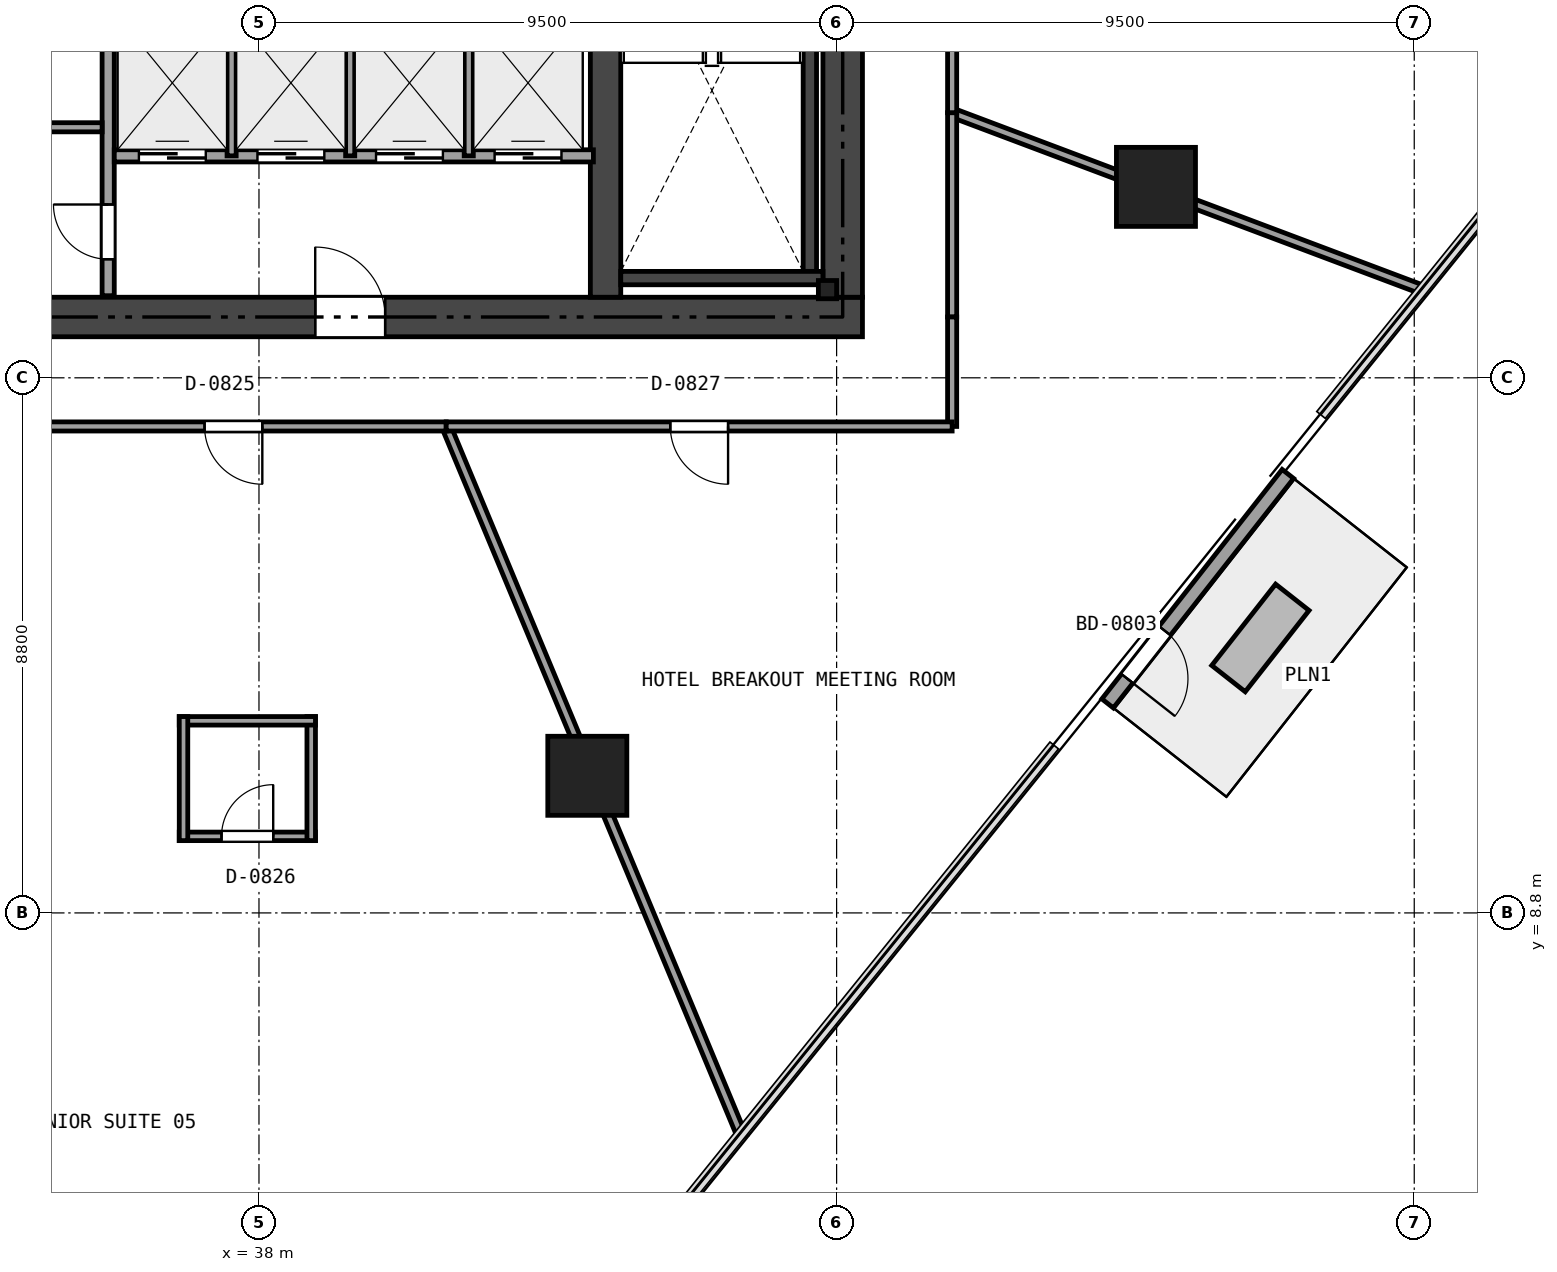
"""IFC4 building model, lengths in metres.
Left out: names, types, materials, properties, quantities, classifications, styles, units other than length and angle.
Written with IfcOpenShell. Run it as: python <this file> out.ifc"""

import sys

from ifc_helpers import new_model, si_unit, direction, frame, frame_2d, origin, origin_2d, place, context, subcontext, project, spatial, rectangle, i_section, extrude, element, fill, save


model = new_model("IFC4")
c1 = context("Model", 3, precision=1e-05, world=origin(), true_north=direction((0.0, 1.0)))
c2 = subcontext(c1, "Body", "Model", "MODEL_VIEW")
j1 = project(units=[si_unit("LENGTHUNIT", "METRE"), si_unit("PLANEANGLEUNIT", "RADIAN")], contexts=[c1])
p1 = place(None, origin())
s1 = spatial("IfcSite", under=j1, at=p1, CompositionType="ELEMENT")
p2 = place(p1, origin())
s2 = spatial("IfcBuilding", under=s1, at=p2, CompositionType="ELEMENT")
p3 = place(p2, frame((0.0, 0.0, 37.35)))
s3 = spatial("IfcBuildingStorey", under=s2, at=p3, CompositionType="ELEMENT", Elevation=37.35)
p4 = place(p3, frame((26.475, 18.6, 0.0), z_axis=(0.0, 0.0, 1.0), x_axis=(1.0, 0.0, 0.0)))
e1 = element("IfcWall", 1, at=p4, inside=s3, PredefinedType="SHEAR", context=c2, shape_type="SweptSolid", body=[
    extrude(rectangle(XDim=21.45, YDim=0.65, at=frame_2d((10.725, 0.0))), origin(), (0.0, 0.0, 1.0), 3.17),
])
p5 = place(p4, frame((12.45, 0.0, 0.0)))
e2 = element("IfcOpeningElement", 2, at=p5, cuts=e1, PredefinedType="OPENING", context=c2, shape_type="SweptSolid", body=[
    extrude(rectangle(XDim=1.15, YDim=2.15, at=frame_2d((0.575, 1.075))), frame((0.0, 0.335, 0.0), z_axis=(0.0, -1.0, 0.0), x_axis=(1.0, 0.0, 0.0)), (0.0, 0.0, 1.0), 0.67),
])
p6 = place(p4, frame((5.275, 0.0, 0.0)))
e3 = element("IfcOpeningElement", 3, at=p6, cuts=e1, PredefinedType="OPENING", context=c2, shape_type="SweptSolid", body=[
    extrude(rectangle(XDim=0.9, YDim=2.1, at=frame_2d((0.45, 1.05))), frame((0.0, 0.335, 0.0), z_axis=(0.0, -1.0, 0.0), x_axis=(1.0, 0.0, 0.0)), (0.0, 0.0, 1.0), 0.67),
])
p7 = place(p3, frame((47.6, 18.925, 0.0), z_axis=(0.0, 0.0, 1.0), x_axis=(0.0, 1.0, 0.0)))
e4 = element("IfcWall", 4, at=p7, inside=s3, PredefinedType="SHEAR", context=c2, shape_type="SweptSolid", body=[
    extrude(rectangle(XDim=14.95, YDim=0.65, at=frame_2d((7.475, 0.0))), origin(), (0.0, 0.0, 1.0), 3.17),
])
p8 = place(p7, frame((6.575, 0.0, 0.0)))
e5 = element("IfcOpeningElement", 5, at=p8, cuts=e4, PredefinedType="OPENING", context=c2, shape_type="SweptSolid", body=[
    extrude(rectangle(XDim=1.1, YDim=2.15, at=frame_2d((0.55, 1.075))), frame((0.0, 0.335, 0.0), z_axis=(0.0, -1.0, 0.0), x_axis=(1.0, 0.0, 0.0)), (0.0, 0.0, 1.0), 0.67),
])
p9 = place(p7, frame((8.475, 0.0, 0.0)))
e6 = element("IfcOpeningElement", 6, at=p9, cuts=e4, PredefinedType="OPENING", context=c2, shape_type="SweptSolid", body=[
    extrude(rectangle(XDim=0.9, YDim=2.1, at=frame_2d((0.45, 1.05))), frame((0.0, 0.335, 0.0), z_axis=(0.0, -1.0, 0.0), x_axis=(1.0, 0.0, 0.0)), (0.0, 0.0, 1.0), 0.67),
])
p10 = place(p7, frame((13.125, 0.0, 0.0)))
e7 = element("IfcOpeningElement", 7, at=p10, cuts=e4, PredefinedType="OPENING", context=c2, shape_type="SweptSolid", body=[
    extrude(rectangle(XDim=0.9, YDim=2.1, at=frame_2d((0.45, 1.05))), frame((0.0, 0.335, 0.0), z_axis=(0.0, -1.0, 0.0), x_axis=(1.0, 0.0, 0.0)), (0.0, 0.0, 1.0), 0.67),
])
p11 = place(p3, frame((43.7, 18.925, 0.0), z_axis=(0.0, 0.0, 1.0), x_axis=(0.0, 1.0, 0.0)))
e8 = element("IfcWall", 8, at=p11, inside=s3, PredefinedType="SHEAR", context=c2, shape_type="SweptSolid", body=[
    extrude(rectangle(XDim=14.95, YDim=0.5, at=frame_2d((7.475, 0.0))), origin(), (0.0, 0.0, 1.0), 3.17),
])
p12 = place(p11, frame((8.075, 0.0, 0.0)))
e9 = element("IfcOpeningElement", 9, at=p12, cuts=e8, PredefinedType="OPENING", context=c2, shape_type="SweptSolid", body=[
    extrude(rectangle(XDim=0.9, YDim=2.1, at=frame_2d((0.45, 1.05))), frame((0.0, 0.26, 0.0), z_axis=(0.0, -1.0, 0.0), x_axis=(1.0, 0.0, 0.0)), (0.0, 0.0, 1.0), 0.52),
])
p13 = place(p3, frame((47.06, 19.35, 0.0), z_axis=(0.0, 0.0, 1.0), x_axis=(0.0, 1.0, 0.0)))
e10 = element("IfcWall", 10, at=p13, inside=s3, PredefinedType="SHEAR", context=c2, shape_type="SweptSolid", body=[
    extrude(rectangle(XDim=5.9, YDim=0.22, at=frame_2d((2.95, 0.0))), origin(), (0.0, 0.0, 1.0), 3.17),
])
p14 = place(p3, frame((43.95, 19.24, 0.0), z_axis=(0.0, 0.0, 1.0), x_axis=(1.0, 0.0, 0.0)))
e11 = element("IfcWall", 11, at=p14, inside=s3, PredefinedType="SHEAR", context=c2, shape_type="SweptSolid", body=[
    extrude(rectangle(XDim=3.325, YDim=0.22, at=frame_2d((1.663, 0.0))), origin(), (0.0, 0.0, 1.0), 3.17),
])
for number, where, z_axis, x_axis in (
    (12, (43.4, 11.055, 0.0), (0.0, 0.0, 1.0), (1.0, 0.0, 0.0)),
    (13, (52.752, 20.74, 0.0), (0.0, 0.0, 1.0), (1.0, 0.0, 0.0)),
):
    element("IfcColumn", number, at=place(p3, frame(where, z_axis=z_axis, x_axis=x_axis)), inside=s3, PredefinedType="COLUMN", context=c2, shape_type="SweptSolid", body=[
        extrude(rectangle(XDim=1.3, YDim=1.3, at=origin_2d()), origin(), (0.0, 0.0, 1.0), 3.17),
    ])
p15 = place(p3, frame((47.35, 19.05, 0.0), z_axis=(0.0, 0.0, 1.0), x_axis=(1.0, 0.0, 0.0)))
e14 = element("IfcColumn", 14, at=p15, inside=s3, PredefinedType="PILASTER", context=c2, shape_type="SweptSolid", body=[
    extrude(i_section(OverallWidth=0.3, OverallDepth=0.3, WebThickness=0.011, FlangeThickness=0.019, at=origin_2d()), origin(), (0.0, 0.0, 1.0), 3.17),
])
p16 = place(p3, frame((54.922, 16.019, 0.0), z_axis=(0.0, 0.0, 1.0), x_axis=(-0.617803579139, -0.78633245997, 0.0)))
e15 = element("IfcWall", 15, at=p16, inside=s3, PredefinedType="SOLIDWALL", context=c2, shape_type="SweptSolid", body=[
    extrude(rectangle(XDim=4.799, YDim=0.24, at=frame_2d((2.4, 0.0))), origin(), (0.0, 0.0, 1.0), 3.17),
])
p17 = place(p16, frame((3.279, 0.0, 0.0)))
e16 = element("IfcOpeningElement", 16, at=p17, cuts=e15, PredefinedType="OPENING", context=c2, shape_type="SweptSolid", body=[
    extrude(rectangle(XDim=1.0, YDim=2.15, at=frame_2d((0.5, 1.075))), frame((0.0, 0.13, 0.0), z_axis=(0.0, -1.0, 0.0), x_axis=(1.0, 0.0, 0.0)), (0.0, 0.0, 1.0), 0.26),
])
p18 = place(p3, frame((35.52, 18.95, 0.0), z_axis=(0.0, 0.0, 1.0), x_axis=(0.0, 1.0, 0.0)))
e17 = element("IfcWall", 17, at=p18, inside=s3, PredefinedType="SOLIDWALL", context=c2, shape_type="SweptSolid", body=[
    extrude(rectangle(XDim=14.9, YDim=0.2, at=frame_2d((7.45, 0.0))), origin(), (0.0, 0.0, 1.0), 2.691),
])
p19 = place(p18, frame((7.755, 0.0, 0.0)))
e18 = element("IfcOpeningElement", 18, at=p19, cuts=e17, PredefinedType="OPENING", context=c2, shape_type="SweptSolid", body=[
    extrude(rectangle(XDim=0.95, YDim=2.15, at=frame_2d((0.475, 1.075))), frame((0.0, 0.11, 0.0), z_axis=(0.0, -1.0, 0.0), x_axis=(1.0, 0.0, 0.0)), (0.0, 0.0, 1.0), 0.22),
])
p20 = place(p18, frame((0.6, 0.0, 0.0)))
e19 = element("IfcOpeningElement", 19, at=p20, cuts=e17, PredefinedType="OPENING", context=c2, shape_type="SweptSolid", body=[
    extrude(rectangle(XDim=0.9, YDim=2.1, at=frame_2d((0.45, 1.05))), frame((0.0, 0.11, 0.0), z_axis=(0.0, -1.0, 0.0), x_axis=(1.0, 0.0, 0.0)), (0.0, 0.0, 1.0), 0.22),
])
p21 = place(p3, frame((33.42, 21.72, 0.0), z_axis=(0.0, 0.0, 1.0), x_axis=(1.0, 0.0, 0.0)))
e20 = element("IfcWall", 20, at=p21, inside=s3, PredefinedType="PARTITIONING", context=c2, shape_type="SweptSolid", body=[
    extrude(rectangle(XDim=2.0, YDim=0.15, at=frame_2d((1.0, 0.0))), origin(), (0.0, 0.0, 1.0), 3.17),
])
p22 = place(p3, frame((35.62, 21.25, 0.0), z_axis=(0.0, 0.0, 1.0), x_axis=(1.0, 0.0, 0.0)))
e21 = element("IfcWall", 21, at=p22, inside=s3, PredefinedType="SOLIDWALL", context=c2, shape_type="SweptSolid", body=[
    extrude(rectangle(XDim=7.88, YDim=0.2, at=frame_2d((3.94, 0.0))), origin(), (0.0, 0.0, 1.0), 3.17),
])
p23 = place(p22, frame((0.405, 0.0, 0.0)))
e22 = element("IfcOpeningElement", 22, at=p23, cuts=e21, PredefinedType="OPENING", context=c2, shape_type="SweptSolid", body=[
    extrude(rectangle(XDim=1.1, YDim=2.15, at=frame_2d((0.55, 1.075))), frame((0.0, 0.11, 0.0), z_axis=(0.0, -1.0, 0.0), x_axis=(1.0, 0.0, 0.0)), (0.0, 0.0, 1.0), 0.22),
])
p24 = place(p22, frame((2.355, 0.0, 0.0)))
e23 = element("IfcOpeningElement", 23, at=p24, cuts=e21, PredefinedType="OPENING", context=c2, shape_type="SweptSolid", body=[
    extrude(rectangle(XDim=1.1, YDim=2.15, at=frame_2d((0.55, 1.075))), frame((0.0, 0.11, 0.0), z_axis=(0.0, -1.0, 0.0), x_axis=(1.0, 0.0, 0.0)), (0.0, 0.0, 1.0), 0.22),
])
p25 = place(p22, frame((4.305, 0.0, 0.0)))
e24 = element("IfcOpeningElement", 24, at=p25, cuts=e21, PredefinedType="OPENING", context=c2, shape_type="SweptSolid", body=[
    extrude(rectangle(XDim=1.1, YDim=2.15, at=frame_2d((0.55, 1.075))), frame((0.0, 0.11, 0.0), z_axis=(0.0, -1.0, 0.0), x_axis=(1.0, 0.0, 0.0)), (0.0, 0.0, 1.0), 0.22),
])
p26 = place(p22, frame((6.255, 0.0, 0.0)))
e25 = element("IfcOpeningElement", 25, at=p26, cuts=e21, PredefinedType="OPENING", context=c2, shape_type="SweptSolid", body=[
    extrude(rectangle(XDim=1.1, YDim=2.15, at=frame_2d((0.55, 1.075))), frame((0.0, 0.11, 0.0), z_axis=(0.0, -1.0, 0.0), x_axis=(1.0, 0.0, 0.0)), (0.0, 0.0, 1.0), 0.22),
])
for number, where, z_axis, x_axis in (
    (26, (37.55, 21.25, 0.0), (0.0, 0.0, 1.0), (0.0, 1.0, 0.0)),
    (27, (39.5, 21.25, 0.0), (0.0, 0.0, 1.0), (0.0, 1.0, 0.0)),
    (28, (41.45, 21.25, 0.0), (0.0, 0.0, 1.0), (0.0, 1.0, 0.0)),
):
    element("IfcWall", number, at=place(p3, frame(where, z_axis=z_axis, x_axis=x_axis)), inside=s3, PredefinedType="PARTITIONING", context=c2, shape_type="SweptSolid", body=[
        extrude(rectangle(XDim=2.4, YDim=0.15, at=frame_2d((1.2, 0.0))), origin(), (0.0, 0.0, 1.0), 2.691),
    ])
p27 = place(p3, frame((36.689, 10.059, 0.0), z_axis=(0.0, 0.0, 1.0), x_axis=(1.0, 0.0, 0.0)))
e29 = element("IfcWall", 29, at=p27, inside=s3, PredefinedType="PARTITIONING", context=c2, shape_type="SweptSolid", body=[
    extrude(rectangle(XDim=2.24, YDim=0.14, at=frame_2d((1.12, 0.0))), origin(), (0.0, 0.0, 1.0), 3.17),
])
p28 = place(p27, frame((0.695, 0.0, 0.0)))
e30 = element("IfcOpeningElement", 30, at=p28, cuts=e29, PredefinedType="OPENING", context=c2, shape_type="SweptSolid", body=[
    extrude(rectangle(XDim=0.85, YDim=2.1, at=frame_2d((0.425, 1.05))), frame((0.0, 0.08, 0.0), z_axis=(0.0, -1.0, 0.0), x_axis=(1.0, 0.0, 0.0)), (0.0, 0.0, 1.0), 0.16),
])
p29 = place(p3, frame((38.859, 9.989, 0.0), z_axis=(0.0, 0.0, 1.0), x_axis=(0.0, 1.0, 0.0)))
e31 = element("IfcWall", 31, at=p29, inside=s3, PredefinedType="PARTITIONING", context=c2, shape_type="SweptSolid", body=[
    extrude(rectangle(XDim=2.04, YDim=0.14, at=frame_2d((1.02, 0.0))), origin(), (0.0, 0.0, 1.0), 2.355),
])
p30 = place(p3, frame((38.929, 11.959, 0.0), z_axis=(0.0, 0.0, 1.0), x_axis=(-1.0, 0.0, 0.0)))
e32 = element("IfcWall", 32, at=p30, inside=s3, PredefinedType="PARTITIONING", context=c2, shape_type="SweptSolid", body=[
    extrude(rectangle(XDim=2.24, YDim=0.14, at=frame_2d((1.12, 0.0))), origin(), (0.0, 0.0, 1.0), 3.17),
])
p31 = place(p3, frame((36.759, 12.029, 0.0), z_axis=(0.0, 0.0, 1.0), x_axis=(0.0, -1.0, 0.0)))
e33 = element("IfcWall", 33, at=p31, inside=s3, PredefinedType="PARTITIONING", context=c2, shape_type="SweptSolid", body=[
    extrude(rectangle(XDim=2.04, YDim=0.14, at=frame_2d((1.02, 0.0))), origin(), (0.0, 0.0, 1.0), 2.355),
])
p32 = place(p3, frame((45.946, 5.115, 0.0), z_axis=(0.0, 0.0, 1.0), x_axis=(-0.384492125133, 0.923128271537, 0.0)))
e34 = element("IfcWall", 34, at=p32, inside=s3, PredefinedType="PARTITIONING", context=c2, shape_type="SweptSolid", body=[
    extrude(rectangle(XDim=12.658, YDim=0.15, at=frame_2d((6.329, 0.0))), origin(), (0.0, 0.0, 1.0), 2.395),
])
p33 = place(p3, frame((41.079, 16.8, 0.0), z_axis=(0.0, 0.0, 1.0), x_axis=(-1.0, 0.0, 0.0)))
e35 = element("IfcWall", 35, at=p33, inside=s3, PredefinedType="PARTITIONING", context=c2, shape_type="SweptSolid", body=[
    extrude(rectangle(XDim=6.998, YDim=0.15, at=frame_2d((3.499, 0.0))), origin(), (0.0, 0.0, 1.0), 2.395),
])
p34 = place(p33, frame((3.024, 0.0, 0.0)))
e36 = element("IfcOpeningElement", 36, at=p34, cuts=e35, PredefinedType="OPENING", context=c2, shape_type="SweptSolid", body=[
    extrude(rectangle(XDim=0.95, YDim=2.15, at=frame_2d((0.475, 1.075))), frame((0.0, 0.085, 0.0), z_axis=(0.0, -1.0, 0.0), x_axis=(1.0, 0.0, 0.0)), (0.0, 0.0, 1.0), 0.17),
])
p35 = place(p3, frame((57.175, 19.034, 0.0), z_axis=(0.0, 0.0, 1.0), x_axis=(-0.935919122146, 0.352214986621, 0.0)))
e37 = element("IfcWall", 37, at=p35, inside=s3, PredefinedType="PARTITIONING", context=c2, shape_type="SweptSolid", body=[
    extrude(rectangle(XDim=8.308, YDim=0.15, at=frame_2d((4.154, 0.0))), origin(), (0.0, 0.0, 1.0), 2.395),
])
p36 = place(p3, frame((49.4, 21.96, 0.0), z_axis=(0.0, 0.0, 1.0), x_axis=(0.0, -1.0, 0.0)))
e38 = element("IfcWall", 38, at=p36, inside=s3, PredefinedType="PARTITIONING", context=c2, shape_type="SweptSolid", body=[
    extrude(rectangle(XDim=3.36, YDim=0.15, at=frame_2d((1.68, 0.0))), origin(), (0.0, 0.0, 1.0), 2.395),
])
p37 = place(p3, frame((49.4, 18.6, 0.0), z_axis=(0.0, 0.0, 1.0), x_axis=(0.0, -1.0, 0.0)))
e39 = element("IfcWall", 39, at=p37, inside=s3, PredefinedType="PARTITIONING", context=c2, shape_type="SweptSolid", body=[
    extrude(rectangle(XDim=1.8, YDim=0.15, at=frame_2d((0.9, 0.0))), origin(), (0.0, 0.0, 1.0), 2.355),
])
p38 = place(p3, frame((49.4, 16.8, 0.0), z_axis=(0.0, 0.0, 1.0), x_axis=(-1.0, 0.0, 0.0)))
e40 = element("IfcWall", 40, at=p38, inside=s3, PredefinedType="PARTITIONING", context=c2, shape_type="SweptSolid", body=[
    extrude(rectangle(XDim=8.321, YDim=0.15, at=frame_2d((4.16, 0.0))), origin(), (0.0, 0.0, 1.0), 2.355),
])
p39 = place(p38, frame((3.685, 0.0, 0.0)))
e41 = element("IfcOpeningElement", 41, at=p39, cuts=e40, PredefinedType="OPENING", context=c2, shape_type="SweptSolid", body=[
    extrude(rectangle(XDim=0.95, YDim=2.15, at=frame_2d((0.475, 1.075))), frame((0.0, 0.085, 0.0), z_axis=(0.0, -1.0, 0.0), x_axis=(1.0, 0.0, 0.0)), (0.0, 0.0, 1.0), 0.17),
])
p40 = place(p3, frame((49.4, 28.993, 0.0), z_axis=(0.0, 0.0, 1.0), x_axis=(0.0, -1.0, 0.0)))
e42 = element("IfcWall", 42, at=p40, inside=s3, PredefinedType="PARTITIONING", context=c2, shape_type="SweptSolid", body=[
    extrude(rectangle(XDim=7.033, YDim=0.15, at=frame_2d((3.517, 0.0))), origin(), (0.0, 0.0, 1.0), 2.395),
])
p41 = place(p40, frame((3.041, 0.0, 0.0)))
e43 = element("IfcOpeningElement", 43, at=p41, cuts=e42, PredefinedType="OPENING", context=c2, shape_type="SweptSolid", body=[
    extrude(rectangle(XDim=0.95, YDim=2.15, at=frame_2d((0.475, 1.075))), frame((0.0, 0.085, 0.0), z_axis=(0.0, -1.0, 0.0), x_axis=(1.0, 0.0, 0.0)), (0.0, 0.0, 1.0), 0.17),
])
p42 = place(p17, origin())
e44 = element("IfcDoor", 44, at=p42, inside=s3, OperationType="SINGLE_SWING_RIGHT", PredefinedType="DOOR", context=c2, shape_type="SweptSolid", body=[
    extrude(rectangle(XDim=1.0, YDim=2.15, at=frame_2d((0.5, 1.075))), frame((0.0, 0.025, 0.0), z_axis=(0.0, -1.0, 0.0), x_axis=(1.0, 0.0, 0.0)), (0.0, 0.0, 1.0), 0.05),
])
fill(e16, e44)
p43 = place(p5, origin())
e45 = element("IfcDoor", 45, at=p43, inside=s3, OperationType="SINGLE_SWING_LEFT", PredefinedType="DOOR", context=c2, shape_type="SweptSolid", body=[
    extrude(rectangle(XDim=1.15, YDim=2.15, at=frame_2d((0.575, 1.075))), frame((0.0, 0.025, 0.0), z_axis=(0.0, -1.0, 0.0), x_axis=(1.0, 0.0, 0.0)), (0.0, 0.0, 1.0), 0.05),
])
fill(e2, e45)
p44 = place(p20, origin())
e46 = element("IfcDoor", 46, at=p44, inside=s3, OperationType="SINGLE_SWING_RIGHT", PredefinedType="DOOR", context=c2, shape_type="SweptSolid", body=[
    extrude(rectangle(XDim=0.9, YDim=2.1, at=frame_2d((0.45, 1.05))), frame((0.0, 0.025, 0.0), z_axis=(0.0, -1.0, 0.0), x_axis=(1.0, 0.0, 0.0)), (0.0, 0.0, 1.0), 0.05),
])
fill(e19, e46)
p45 = place(p23, origin())
e47 = element("IfcDoor", 47, at=p45, inside=s3, OperationType="SLIDING_TO_LEFT", PredefinedType="DOOR", context=c2, shape_type="SweptSolid", body=[
    extrude(rectangle(XDim=1.1, YDim=2.15, at=frame_2d((0.55, 1.075))), frame((0.0, 0.025, 0.0), z_axis=(0.0, -1.0, 0.0), x_axis=(1.0, 0.0, 0.0)), (0.0, 0.0, 1.0), 0.05),
])
fill(e22, e47)
p46 = place(p24, origin())
e48 = element("IfcDoor", 48, at=p46, inside=s3, OperationType="SLIDING_TO_LEFT", PredefinedType="DOOR", context=c2, shape_type="SweptSolid", body=[
    extrude(rectangle(XDim=1.1, YDim=2.15, at=frame_2d((0.55, 1.075))), frame((0.0, 0.025, 0.0), z_axis=(0.0, -1.0, 0.0), x_axis=(1.0, 0.0, 0.0)), (0.0, 0.0, 1.0), 0.05),
])
fill(e23, e48)
p47 = place(p25, origin())
e49 = element("IfcDoor", 49, at=p47, inside=s3, OperationType="SLIDING_TO_LEFT", PredefinedType="DOOR", context=c2, shape_type="SweptSolid", body=[
    extrude(rectangle(XDim=1.1, YDim=2.15, at=frame_2d((0.55, 1.075))), frame((0.0, 0.025, 0.0), z_axis=(0.0, -1.0, 0.0), x_axis=(1.0, 0.0, 0.0)), (0.0, 0.0, 1.0), 0.05),
])
fill(e24, e49)
p48 = place(p26, origin())
e50 = element("IfcDoor", 50, at=p48, inside=s3, OperationType="SLIDING_TO_LEFT", PredefinedType="DOOR", context=c2, shape_type="SweptSolid", body=[
    extrude(rectangle(XDim=1.1, YDim=2.15, at=frame_2d((0.55, 1.075))), frame((0.0, 0.025, 0.0), z_axis=(0.0, -1.0, 0.0), x_axis=(1.0, 0.0, 0.0)), (0.0, 0.0, 1.0), 0.05),
])
fill(e25, e50)
p49 = place(p34, origin())
e51 = element("IfcDoor", 51, at=p49, inside=s3, OperationType="SINGLE_SWING_LEFT", PredefinedType="DOOR", context=c2, shape_type="SweptSolid", body=[
    extrude(rectangle(XDim=0.95, YDim=2.15, at=frame_2d((0.475, 1.075))), frame((0.0, 0.025, 0.0), z_axis=(0.0, -1.0, 0.0), x_axis=(1.0, 0.0, 0.0)), (0.0, 0.0, 1.0), 0.05),
])
fill(e36, e51)
p50 = place(p28, origin())
e52 = element("IfcDoor", 52, at=p50, inside=s3, OperationType="SINGLE_SWING_RIGHT", PredefinedType="DOOR", context=c2, shape_type="SweptSolid", body=[
    extrude(rectangle(XDim=0.85, YDim=2.1, at=frame_2d((0.425, 1.05))), frame((0.0, 0.025, 0.0), z_axis=(0.0, -1.0, 0.0), x_axis=(1.0, 0.0, 0.0)), (0.0, 0.0, 1.0), 0.05),
])
fill(e30, e52)
p51 = place(p39, origin())
e53 = element("IfcDoor", 53, at=p51, inside=s3, OperationType="SINGLE_SWING_LEFT", PredefinedType="DOOR", context=c2, shape_type="SweptSolid", body=[
    extrude(rectangle(XDim=0.95, YDim=2.15, at=frame_2d((0.475, 1.075))), frame((0.0, 0.025, 0.0), z_axis=(0.0, -1.0, 0.0), x_axis=(1.0, 0.0, 0.0)), (0.0, 0.0, 1.0), 0.05),
])
fill(e41, e53)
save(model, sys.argv[1])
